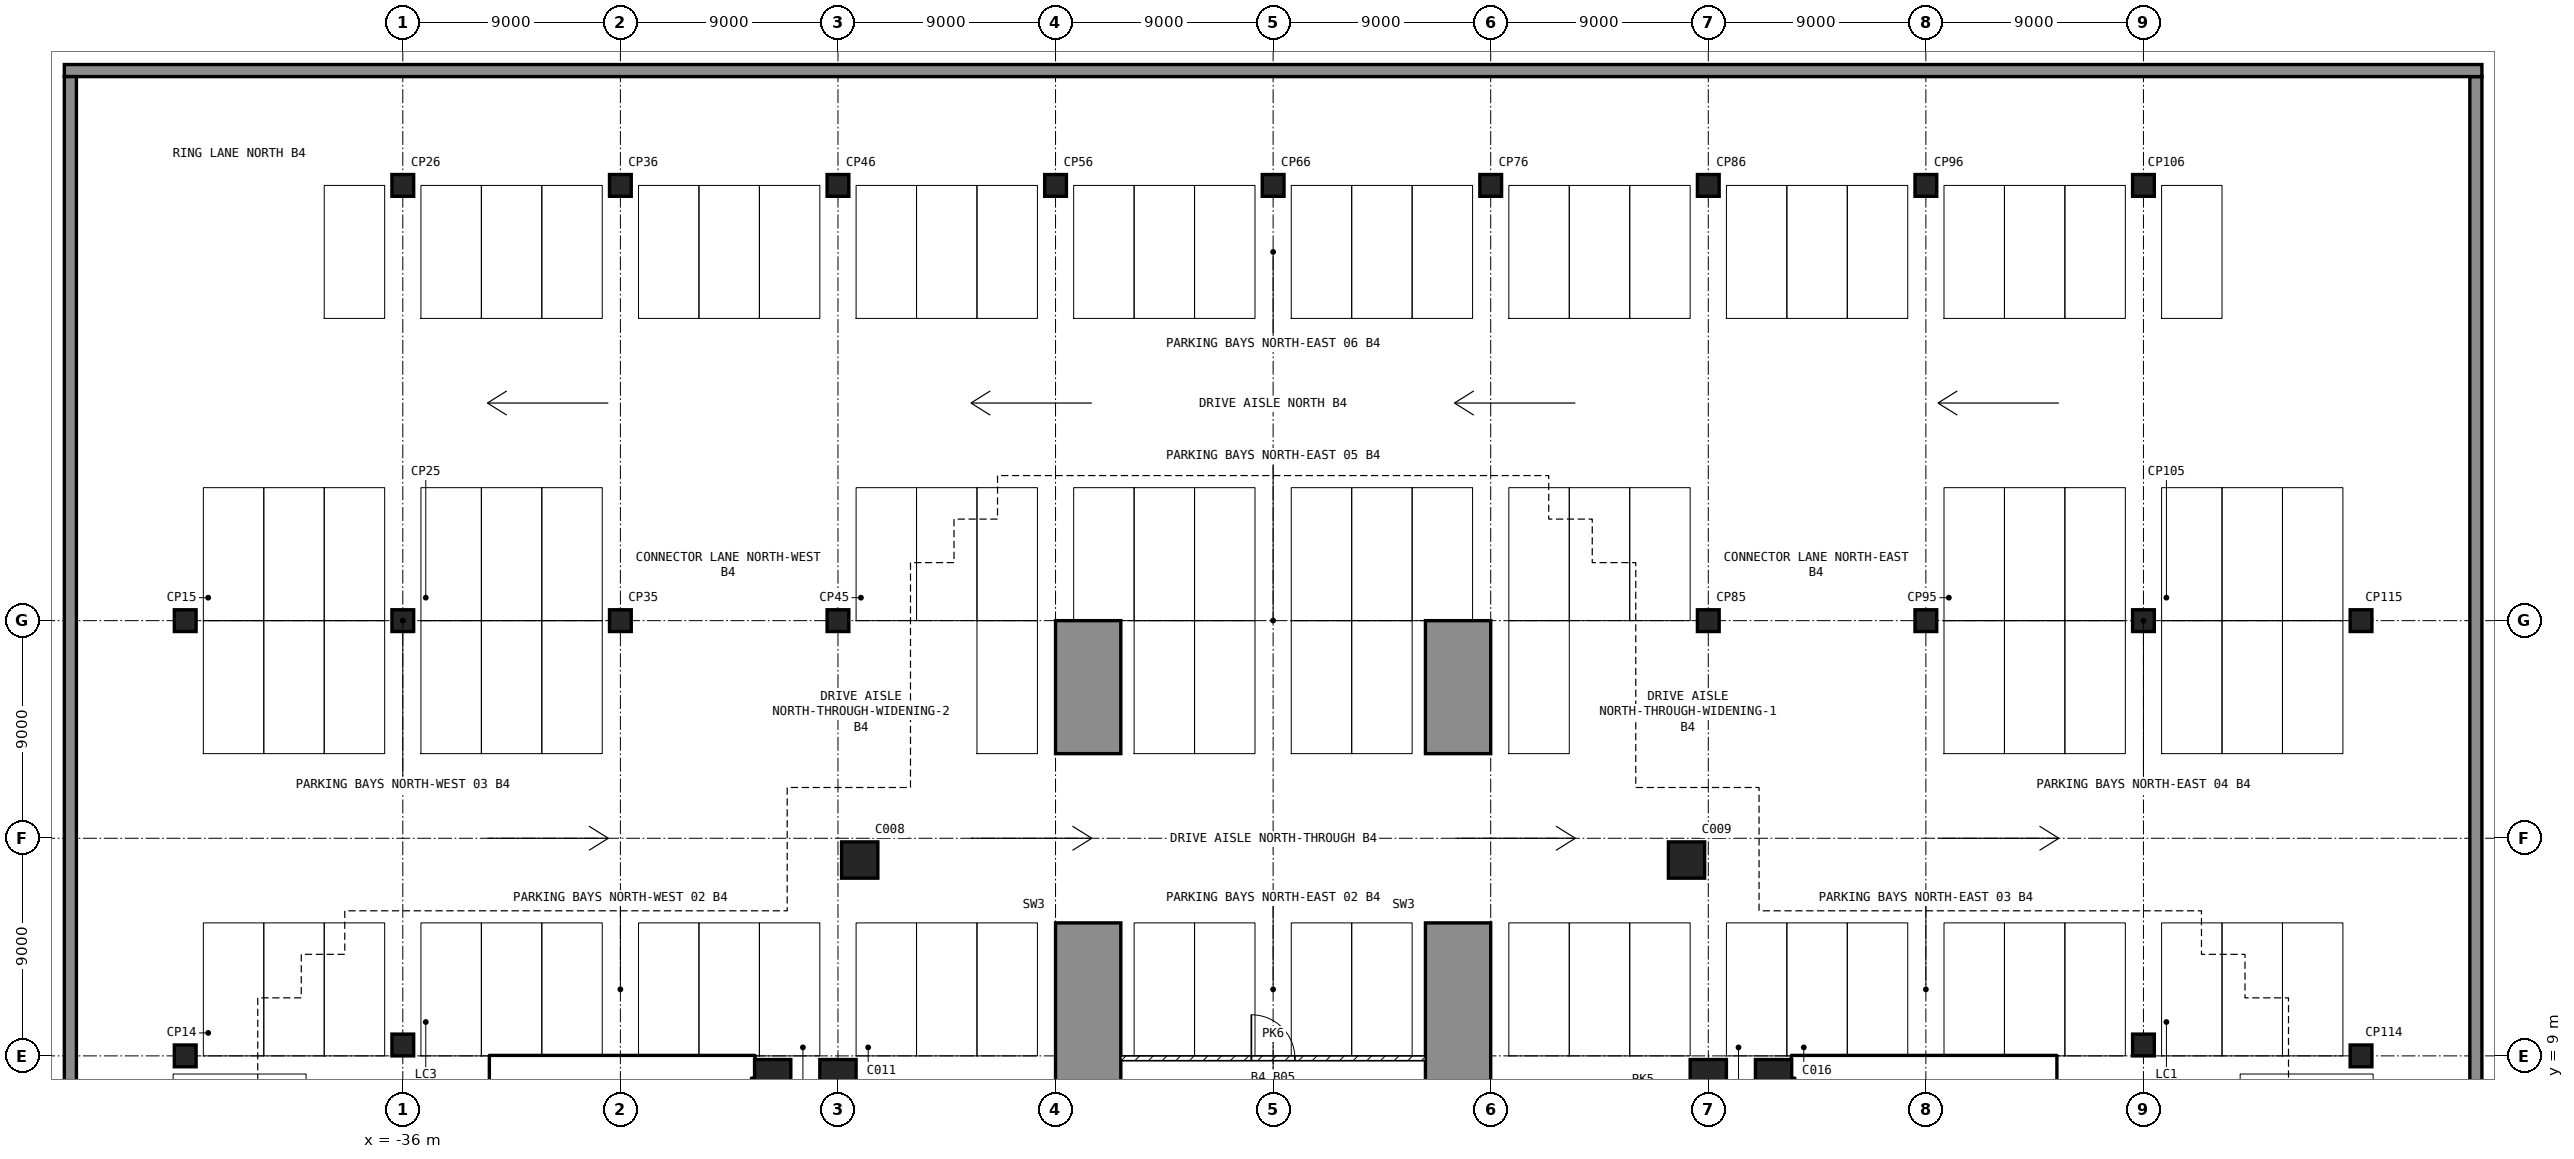
"""IFC4 building model, lengths in metres.
Left out: names, types, materials, properties, quantities, classifications, styles, units other than length and angle.
Written with IfcOpenShell. Run it as: python <this file> out.ifc"""

import sys

from ifc_helpers import new_model, si_unit, direction, frame, frame_2d, origin, origin_2d, place, context, subcontext, project, spatial, polyline, rectangle, outline, extrude, element, fill, save


model = new_model("IFC4")
c1 = context("Model", 3, precision=1e-05, world=origin(), true_north=direction((0.0, 1.0)))
c2 = subcontext(c1, "Body", "Model", "MODEL_VIEW")
j1 = project(units=[si_unit("LENGTHUNIT", "METRE"), si_unit("PLANEANGLEUNIT", "RADIAN")], contexts=[c1])
p1 = place(None, origin())
s1 = spatial("IfcSite", under=j1, at=p1, CompositionType="ELEMENT")
p2 = place(p1, origin())
s2 = spatial("IfcBuilding", under=s1, at=p2, CompositionType="ELEMENT")
p3 = place(p2, frame((0.0, 0.0, -17.1)))
s3 = spatial("IfcBuildingStorey", under=s2, at=p3, CompositionType="ELEMENT", Elevation=-17.1)
p4 = place(p3, frame((-50.0, 49.75, -0.3), z_axis=(0.0, 0.0, 1.0), x_axis=(1.0, 0.0, 0.0)))
e1 = element("IfcWall", 1, at=p4, inside=s3, PredefinedType="SOLIDWALL", context=c2, shape_type="SweptSolid", body=[
    extrude(rectangle(XDim=100.0, YDim=0.5, at=frame_2d((50.0, 0.0))), origin(), (0.0, 0.0, 1.0), 4.2),
])
for number, where, z_axis, x_axis in (
    (2, (49.75, -49.5, -0.3), (0.0, 0.0, 1.0), (0.0, 1.0, 0.0)),
    (3, (-49.75, -49.5, -0.3), (0.0, 0.0, 1.0), (0.0, 1.0, 0.0)),
):
    element("IfcWall", number, at=place(p3, frame(where, z_axis=z_axis, x_axis=x_axis)), inside=s3, PredefinedType="SOLIDWALL", context=c2, shape_type="SweptSolid", body=[
        extrude(rectangle(XDim=99.0, YDim=0.5, at=frame_2d((49.5, 0.0))), origin(), (0.0, 0.0, 1.0), 4.2),
    ])
for number, where, z_axis, x_axis in (
    (4, (-20.7, 8.1, 0.0), (0.0, 0.0, 1.0), (1.0, 0.0, 0.0)),
    (5, (-18.0, 8.1, 0.0), (0.0, 0.0, 1.0), (1.0, 0.0, 0.0)),
    (6, (18.0, 8.1, 0.0), (0.0, 0.0, 1.0), (1.0, 0.0, 0.0)),
    (7, (20.7, 8.1, 0.0), (0.0, 0.0, 1.0), (1.0, 0.0, 0.0)),
    (8, (17.1, 17.1, 0.0), (0.0, 0.0, 1.0), (1.0, 0.0, 0.0)),
    (9, (-17.1, 17.1, 0.0), (0.0, 0.0, 1.0), (1.0, 0.0, 0.0)),
):
    element("IfcColumn", number, at=place(p3, frame(where, z_axis=z_axis, x_axis=x_axis)), inside=s3, PredefinedType="COLUMN", context=c2, shape_type="SweptSolid", body=[
        extrude(rectangle(XDim=1.5, YDim=1.5, at=origin_2d()), origin(), (0.0, 0.0, 1.0), 3.9),
    ])
for number, where, z_axis, x_axis in (
    (10, (-45.0, 9.0, -0.3), (0.0, 0.0, 1.0), (1.0, 0.0, 0.0)),
    (11, (-45.0, 27.0, -0.3), (0.0, 0.0, 1.0), (1.0, 0.0, 0.0)),
    (12, (-36.0, 27.0, -0.3), (0.0, 0.0, 1.0), (1.0, 0.0, 0.0)),
    (13, (-36.0, 45.0, -0.3), (0.0, 0.0, 1.0), (1.0, 0.0, 0.0)),
    (14, (-27.0, 27.0, -0.3), (0.0, 0.0, 1.0), (1.0, 0.0, 0.0)),
    (15, (-27.0, 45.0, -0.3), (0.0, 0.0, 1.0), (1.0, 0.0, 0.0)),
    (16, (-18.0, 27.0, -0.3), (0.0, 0.0, 1.0), (1.0, 0.0, 0.0)),
    (17, (-18.0, 45.0, -0.3), (0.0, 0.0, 1.0), (1.0, 0.0, 0.0)),
    (18, (-9.0, 45.0, -0.3), (0.0, 0.0, 1.0), (1.0, 0.0, 0.0)),
    (19, (0.0, 45.0, -0.3), (0.0, 0.0, 1.0), (1.0, 0.0, 0.0)),
    (20, (9.0, 45.0, -0.3), (0.0, 0.0, 1.0), (1.0, 0.0, 0.0)),
    (21, (18.0, 27.0, -0.3), (0.0, 0.0, 1.0), (1.0, 0.0, 0.0)),
    (22, (18.0, 45.0, -0.3), (0.0, 0.0, 1.0), (1.0, 0.0, 0.0)),
    (23, (27.0, 27.0, -0.3), (0.0, 0.0, 1.0), (1.0, 0.0, 0.0)),
    (24, (27.0, 45.0, -0.3), (0.0, 0.0, 1.0), (1.0, 0.0, 0.0)),
    (25, (36.0, 27.0, -0.3), (0.0, 0.0, 1.0), (1.0, 0.0, 0.0)),
    (26, (36.0, 45.0, -0.3), (0.0, 0.0, 1.0), (1.0, 0.0, 0.0)),
    (27, (45.0, 9.0, -0.3), (0.0, 0.0, 1.0), (1.0, 0.0, 0.0)),
    (28, (45.0, 27.0, -0.3), (0.0, 0.0, 1.0), (1.0, 0.0, 0.0)),
):
    element("IfcColumn", number, at=place(p3, frame(where, z_axis=z_axis, x_axis=x_axis)), inside=s3, PredefinedType="COLUMN", context=c2, shape_type="SweptSolid", body=[
        extrude(rectangle(XDim=0.9, YDim=0.9, at=origin_2d()), origin(), (0.0, 0.0, 1.0), 4.2),
    ])
for number, where, z_axis, x_axis in (
    (29, (36.0, 9.45, 0.0), (0.0, 0.0, 1.0), (1.0, 0.0, 0.0)),
    (30, (-36.0, 9.45, 0.0), (0.0, 0.0, 1.0), (1.0, 0.0, 0.0)),
):
    element("IfcColumn", number, at=place(p3, frame(where, z_axis=z_axis, x_axis=x_axis)), inside=s3, PredefinedType="COLUMN", context=c2, shape_type="SweptSolid", body=[
        extrude(rectangle(XDim=0.9, YDim=0.9, at=origin_2d()), origin(), (0.0, 0.0, 1.0), 3.9),
    ])
for number, where, z_axis, x_axis in (
    (31, (6.3, 3.5, 0.0), (1.0, 0.0, 0.0), (0.0, 1.0, 0.0)),
    (32, (-9.0, 3.5, 0.0), (1.0, 0.0, 0.0), (0.0, 1.0, 0.0)),
):
    element("IfcWall", number, at=place(p3, frame(where, z_axis=z_axis, x_axis=x_axis)), inside=s3, PredefinedType="SOLIDWALL", context=c2, shape_type="SweptSolid", body=[
        extrude(outline(polyline([(0.0, 0.0), (11.0, 0.0), (11.0, 3.0), (18.0, 3.0), (18.0, 0.0), (23.5, 0.0), (23.5, 3.9), (0.0, 3.9), (0.0, 0.0)])), origin(), (0.0, 0.0, 1.0), 2.7),
    ])
p5 = place(p3, frame((31.95, 7.2, 0.0), z_axis=(0.0, 0.0, 1.0), x_axis=(0.0, 1.0, 0.0)))
e33 = element("IfcWall", 33, at=p5, inside=s3, PredefinedType="SHEAR", context=c2, shape_type="SweptSolid", body=[
    extrude(rectangle(XDim=1.8, YDim=0.9, at=frame_2d((0.9, 0.0))), origin(), (0.0, 0.0, 1.0), 3.9),
])
p6 = place(p3, frame((21.45, 8.55, 0.0), z_axis=(0.0, 0.0, 1.0), x_axis=(1.0, 0.0, 0.0)))
e34 = element("IfcWall", 34, at=p6, inside=s3, PredefinedType="SHEAR", context=c2, shape_type="SweptSolid", body=[
    extrude(rectangle(XDim=10.05, YDim=0.9, at=frame_2d((5.025, 0.0))), origin(), (0.0, 0.0, 1.0), 3.9),
])
p7 = place(p3, frame((21.825, 1.2, 0.0), z_axis=(0.0, 0.0, 1.0), x_axis=(0.0, 1.0, 0.0)))
e35 = element("IfcWall", 35, at=p7, inside=s3, PredefinedType="SHEAR", context=c2, shape_type="SweptSolid", body=[
    extrude(rectangle(XDim=6.9, YDim=0.45, at=frame_2d((3.45, 0.0))), origin(), (0.0, 0.0, 1.0), 3.9),
])
p8 = place(p3, frame((28.25, 5.25, 0.0), z_axis=(0.0, 0.0, 1.0), x_axis=(0.0, 1.0, 0.0)))
e36 = element("IfcWall", 36, at=p8, inside=s3, PredefinedType="SOLIDWALL", context=c2, shape_type="SweptSolid", body=[
    extrude(rectangle(XDim=2.85, YDim=0.2, at=frame_2d((1.425, 0.0))), origin(), (0.0, 0.0, 1.0), 3.9),
])
p9 = place(p3, frame((-31.95, 7.2, 0.0), z_axis=(0.0, 0.0, 1.0), x_axis=(0.0, 1.0, 0.0)))
e37 = element("IfcWall", 37, at=p9, inside=s3, PredefinedType="SHEAR", context=c2, shape_type="SweptSolid", body=[
    extrude(rectangle(XDim=1.8, YDim=0.9, at=frame_2d((0.9, 0.0))), origin(), (0.0, 0.0, 1.0), 3.9),
])
p10 = place(p3, frame((-31.5, 8.55, 0.0), z_axis=(0.0, 0.0, 1.0), x_axis=(1.0, 0.0, 0.0)))
e38 = element("IfcWall", 38, at=p10, inside=s3, PredefinedType="SHEAR", context=c2, shape_type="SweptSolid", body=[
    extrude(rectangle(XDim=10.05, YDim=0.9, at=frame_2d((5.025, 0.0))), origin(), (0.0, 0.0, 1.0), 3.9),
])
p11 = place(p3, frame((-21.825, 1.2, 0.0), z_axis=(0.0, 0.0, 1.0), x_axis=(0.0, 1.0, 0.0)))
e39 = element("IfcWall", 39, at=p11, inside=s3, PredefinedType="SHEAR", context=c2, shape_type="SweptSolid", body=[
    extrude(rectangle(XDim=6.9, YDim=0.45, at=frame_2d((3.45, 0.0))), origin(), (0.0, 0.0, 1.0), 3.9),
])
p12 = place(p3, frame((-28.25, 5.25, 0.0), z_axis=(0.0, 0.0, 1.0), x_axis=(0.0, 1.0, 0.0)))
e40 = element("IfcWall", 40, at=p12, inside=s3, PredefinedType="SOLIDWALL", context=c2, shape_type="SweptSolid", body=[
    extrude(rectangle(XDim=2.85, YDim=0.2, at=frame_2d((1.425, 0.0))), origin(), (0.0, 0.0, 1.0), 3.9),
])
p13 = place(p3, frame((-6.3, 8.9, 0.0), z_axis=(0.0, 0.0, 1.0), x_axis=(1.0, 0.0, 0.0)))
e41 = element("IfcWall", 41, at=p13, inside=s3, PredefinedType="PARTITIONING", context=c2, shape_type="SweptSolid", body=[
    extrude(rectangle(XDim=12.6, YDim=0.2, at=frame_2d((6.3, 0.0))), origin(), (0.0, 0.0, 1.0), 3.9),
])
p14 = place(p13, frame((5.4, 0.0, 0.0)))
e42 = element("IfcOpeningElement", 42, at=p14, cuts=e41, PredefinedType="OPENING", context=c2, shape_type="SweptSolid", body=[
    extrude(rectangle(XDim=1.8, YDim=2.1, at=frame_2d((0.9, 1.05))), frame((0.0, 0.11, 0.0), z_axis=(0.0, -1.0, 0.0), x_axis=(1.0, 0.0, 0.0)), (0.0, 0.0, 1.0), 0.22),
])
p15 = place(p14, origin())
e43 = element("IfcDoor", 43, at=p15, inside=s3, OperationType="SINGLE_SWING_LEFT", PredefinedType="DOOR", context=c2, shape_type="SweptSolid", body=[
    extrude(rectangle(XDim=1.8, YDim=2.1, at=frame_2d((0.9, 1.05))), frame((0.0, 0.025, 0.0), z_axis=(0.0, -1.0, 0.0), x_axis=(1.0, 0.0, 0.0)), (0.0, 0.0, 1.0), 0.05),
])
fill(e42, e43)
save(model, sys.argv[1])
